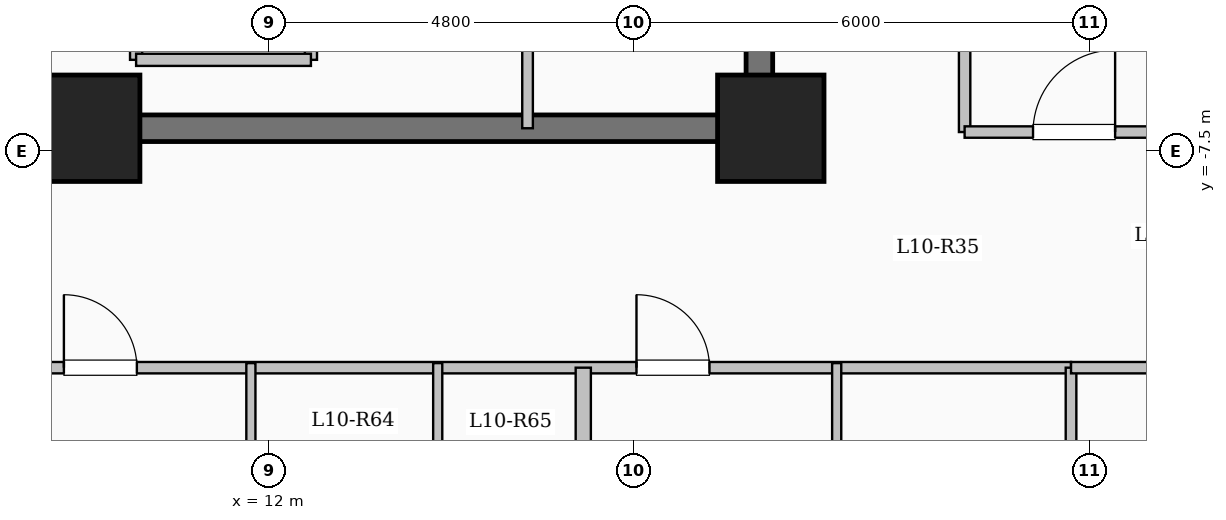
"""IFC4 building model, lengths in metres.
Left out: names, types, materials, properties, quantities, classifications, styles, units other than length and angle.
Written with IfcOpenShell. Run it as: python <this file> out.ifc"""

import sys

from ifc_helpers import new_model, si_unit, direction, frame, frame_2d, origin, origin_2d, place, context, subcontext, project, spatial, rectangle, extrude, element, fill, save


model = new_model("IFC4")
c1 = context("Model", 3, precision=1e-05, world=origin(), true_north=direction((0.0, 1.0)))
c2 = subcontext(c1, "Body", "Model", "MODEL_VIEW")
j1 = project(units=[si_unit("LENGTHUNIT", "METRE"), si_unit("PLANEANGLEUNIT", "RADIAN")], contexts=[c1])
p1 = place(None, origin())
s1 = spatial("IfcSite", under=j1, at=p1, CompositionType="ELEMENT")
p2 = place(p1, origin())
s2 = spatial("IfcBuilding", under=s1, at=p2, CompositionType="ELEMENT")
p3 = place(p2, frame((0.0, 0.0, 40.75)))
s3 = spatial("IfcBuildingStorey", under=s2, at=p3, CompositionType="ELEMENT", Elevation=40.75)
for number, where, z_axis, x_axis in (
    (1, (9.6, -7.2, 0.0), (0.0, 0.0, 1.0), (1.0, 0.0, 0.0)),
    (2, (18.6, -7.2, 0.0), (0.0, 0.0, 1.0), (1.0, 0.0, 0.0)),
):
    element("IfcColumn", number, at=place(p3, frame(where, z_axis=z_axis, x_axis=x_axis)), inside=s3, PredefinedType="COLUMN", context=c2, shape_type="SweptSolid", body=[
        extrude(rectangle(XDim=1.4, YDim=1.4, at=origin_2d()), origin(), (0.0, 0.0, 1.0), 3.35),
    ])
for number, where, z_axis, x_axis in (
    (3, (10.25, -6.3, 0.0), (0.0, 0.0, 1.0), (0.0, 1.0, 0.0)),
    (4, (12.55, -6.3, 0.0), (0.0, 0.0, 1.0), (0.0, 1.0, 0.0)),
):
    element("IfcWall", number, at=place(p3, frame(where, z_axis=z_axis, x_axis=x_axis)), inside=s3, PredefinedType="SOLIDWALL", context=c2, shape_type="SweptSolid", body=[
        extrude(rectangle(XDim=2.6, YDim=0.16, at=frame_2d((1.3, 0.0))), origin(), (0.0, 0.0, 1.0), 3.1),
    ])
p4 = place(p3, frame((10.25, -6.3, 0.0), z_axis=(0.0, 0.0, 1.0), x_axis=(1.0, 0.0, 0.0)))
e5 = element("IfcWall", 5, at=p4, inside=s3, PredefinedType="SOLIDWALL", context=c2, shape_type="SweptSolid", body=[
    extrude(rectangle(XDim=2.3, YDim=0.16, at=frame_2d((1.15, 0.0))), origin(), (0.0, 0.0, 1.0), 3.1),
])
p5 = place(p3, frame((18.45, -7.375, 0.0), z_axis=(0.0, 0.0, 1.0), x_axis=(0.0, 1.0, 0.0)))
e6 = element("IfcWall", 6, at=p5, inside=s3, PredefinedType="SHEAR", context=c2, shape_type="SweptSolid", body=[
    extrude(rectangle(XDim=14.05, YDim=0.35, at=frame_2d((7.025, 0.0))), origin(), (0.0, 0.0, 1.0), 3.35),
])
p6 = place(p3, frame((10.075, -7.2, 0.0), z_axis=(0.0, 0.0, 1.0), x_axis=(1.0, 0.0, 0.0)))
e7 = element("IfcWall", 7, at=p6, inside=s3, PredefinedType="SHEAR", context=c2, shape_type="SweptSolid", body=[
    extrude(rectangle(XDim=8.55, YDim=0.35, at=frame_2d((4.275, 0.0))), origin(), (0.0, 0.0, 1.0), 3.35),
])
p7 = place(p3, frame((15.4, -7.2, 0.0), z_axis=(0.0, 0.0, 1.0), x_axis=(0.0, 1.0, 0.0)))
e8 = element("IfcWall", 8, at=p7, inside=s3, PredefinedType="PARTITIONING", context=c2, shape_type="SweptSolid", body=[
    extrude(rectangle(XDim=10.45, YDim=0.14, at=frame_2d((5.225, 0.0))), origin(), (0.0, 0.0, 1.0), 3.1),
])
p8 = place(p7, frame((9.25, 0.0, 0.0)))
e9 = element("IfcOpeningElement", 9, at=p8, cuts=e8, PredefinedType="OPENING", context=c2, shape_type="SweptSolid", body=[
    extrude(rectangle(XDim=0.9, YDim=2.08, at=frame_2d((0.45, 1.04))), frame((0.0, 0.08, 0.0), z_axis=(0.0, -1.0, 0.0), x_axis=(1.0, 0.0, 0.0)), (0.0, 0.0, 1.0), 0.16),
])
p9 = place(p3, frame((21.15, -7.25, 0.0), z_axis=(0.0, 0.0, 1.0), x_axis=(0.0, 1.0, 0.0)))
e10 = element("IfcWall", 10, at=p9, inside=s3, PredefinedType="PARTITIONING", context=c2, shape_type="SweptSolid", body=[
    extrude(rectangle(XDim=18.0, YDim=0.15, at=frame_2d((9.0, 0.0))), origin(), (0.0, 0.0, 1.0), 2.585),
])
p10 = place(p3, frame((8.55, -10.35, 0.0), z_axis=(0.0, 0.0, 1.0), x_axis=(1.0, 0.0, 0.0)))
e11 = element("IfcWall", 11, at=p10, inside=s3, PredefinedType="PARTITIONING", context=c2, shape_type="SweptSolid", body=[
    extrude(rectangle(XDim=14.0, YDim=0.15, at=frame_2d((7.0, 0.0))), origin(), (0.0, 0.0, 1.0), 3.1),
])
p11 = place(p10, frame((0.75, 0.0, 0.0)))
e12 = element("IfcOpeningElement", 12, at=p11, cuts=e11, PredefinedType="OPENING", context=c2, shape_type="SweptSolid", body=[
    extrude(rectangle(XDim=0.96, YDim=2.15, at=frame_2d((0.48, 1.075))), frame((0.0, 0.085, 0.0), z_axis=(0.0, -1.0, 0.0), x_axis=(1.0, 0.0, 0.0)), (0.0, 0.0, 1.0), 0.17),
])
p12 = place(p10, frame((8.283, 0.0, 0.0)))
e13 = element("IfcOpeningElement", 13, at=p12, cuts=e11, PredefinedType="OPENING", context=c2, shape_type="SweptSolid", body=[
    extrude(rectangle(XDim=0.96, YDim=2.15, at=frame_2d((0.48, 1.075))), frame((0.0, 0.085, 0.0), z_axis=(0.0, -1.0, 0.0), x_axis=(1.0, 0.0, 0.0)), (0.0, 0.0, 1.0), 0.17),
])
p13 = place(p3, frame((16.133, -23.6, 0.0), z_axis=(0.0, 0.0, 1.0), x_axis=(0.0, 1.0, 0.0)))
e14 = element("IfcWall", 14, at=p13, inside=s3, PredefinedType="SOLIDWALL", context=c2, shape_type="SweptSolid", body=[
    extrude(rectangle(XDim=13.25, YDim=0.2, at=frame_2d((6.625, 0.0))), origin(), (0.0, 0.0, 1.0), 3.1),
])
p14 = place(p3, frame((11.76, -23.6, 0.0), z_axis=(0.0, 0.0, 1.0), x_axis=(0.0, 1.0, 0.0)))
e15 = element("IfcWall", 15, at=p14, inside=s3, PredefinedType="PARTITIONING", context=c2, shape_type="SweptSolid", body=[
    extrude(rectangle(XDim=13.31, YDim=0.12, at=frame_2d((6.655, 0.0))), origin(), (0.0, 0.0, 1.0), 3.1),
])
p15 = place(p14, frame((9.315, 0.0, 0.0)))
e16 = element("IfcOpeningElement", 16, at=p15, cuts=e15, PredefinedType="OPENING", context=c2, shape_type="SweptSolid", body=[
    extrude(rectangle(XDim=1.08, YDim=2.15, at=frame_2d((0.54, 1.075))), frame((0.0, 0.07, 0.0), z_axis=(0.0, -1.0, 0.0), x_axis=(1.0, 0.0, 0.0)), (0.0, 0.0, 1.0), 0.14),
])
p16 = place(p3, frame((14.218, -12.92, 0.0), z_axis=(0.0, 0.0, 1.0), x_axis=(0.0, 1.0, 0.0)))
e17 = element("IfcWall", 17, at=p16, inside=s3, PredefinedType="PARTITIONING", context=c2, shape_type="SweptSolid", body=[
    extrude(rectangle(XDim=2.63, YDim=0.12, at=frame_2d((1.315, 0.0))), origin(), (0.0, 0.0, 1.0), 3.1),
])
p17 = place(p3, frame((19.467, -13.51, 0.0), z_axis=(0.0, 0.0, 1.0), x_axis=(0.0, 1.0, 0.0)))
e18 = element("IfcWall", 18, at=p17, inside=s3, PredefinedType="PARTITIONING", context=c2, shape_type="SweptSolid", body=[
    extrude(rectangle(XDim=3.22, YDim=0.12, at=frame_2d((1.61, 0.0))), origin(), (0.0, 0.0, 1.0), 3.1),
])
p18 = place(p17, frame((1.14, 0.0, 0.0)))
e19 = element("IfcOpeningElement", 19, at=p18, cuts=e18, PredefinedType="OPENING", context=c2, shape_type="SweptSolid", body=[
    extrude(rectangle(XDim=0.88, YDim=2.1, at=frame_2d((0.44, 1.05))), frame((0.0, 0.07, 0.0), z_axis=(0.0, -1.0, 0.0), x_axis=(1.0, 0.0, 0.0)), (0.0, 0.0, 1.0), 0.14),
])
p19 = place(p3, frame((21.15, -7.25, 0.0), z_axis=(0.0, 0.0, 1.0), x_axis=(1.0, 0.0, 0.0)))
e20 = element("IfcWall", 20, at=p19, inside=s3, PredefinedType="PARTITIONING", context=c2, shape_type="SweptSolid", body=[
    extrude(rectangle(XDim=7.53, YDim=0.15, at=frame_2d((3.765, 0.0))), origin(), (0.0, 0.0, 1.0), 3.1),
])
p20 = place(p19, frame((0.9, 0.0, 0.0)))
e21 = element("IfcOpeningElement", 21, at=p20, cuts=e20, PredefinedType="OPENING", context=c2, shape_type="SweptSolid", body=[
    extrude(rectangle(XDim=1.08, YDim=2.15, at=frame_2d((0.54, 1.075))), frame((0.0, 0.085, 0.0), z_axis=(0.0, -1.0, 0.0), x_axis=(1.0, 0.0, 0.0)), (0.0, 0.0, 1.0), 0.17),
])
p21 = place(p3, frame((22.55, -19.05, 0.0), z_axis=(0.0, 0.0, 1.0), x_axis=(0.0, 1.0, 0.0)))
e22 = element("IfcWall", 22, at=p21, inside=s3, PredefinedType="PARTITIONING", context=c2, shape_type="SweptSolid", body=[
    extrude(rectangle(XDim=8.7, YDim=0.14, at=frame_2d((4.35, 0.0))), origin(), (0.0, 0.0, 1.0), 3.1),
])
p22 = place(p3, frame((22.55, -10.35, 0.0), z_axis=(0.0, 0.0, 1.0), x_axis=(1.0, 0.0, 0.0)))
e23 = element("IfcWall", 23, at=p22, inside=s3, PredefinedType="PARTITIONING", context=c2, shape_type="SweptSolid", body=[
    extrude(rectangle(XDim=6.13, YDim=0.15, at=frame_2d((3.065, 0.0))), origin(), (0.0, 0.0, 1.0), 3.1),
])
p23 = place(p22, frame((2.59, 0.0, 0.0)))
e24 = element("IfcOpeningElement", 24, at=p23, cuts=e23, PredefinedType="OPENING", context=c2, shape_type="SweptSolid", body=[
    extrude(rectangle(XDim=0.95, YDim=2.15, at=frame_2d((0.475, 1.075))), frame((0.0, 0.085, 0.0), z_axis=(0.0, -1.0, 0.0), x_axis=(1.0, 0.0, 0.0)), (0.0, 0.0, 1.0), 0.17),
])
p24 = place(p11, origin())
e25 = element("IfcDoor", 25, at=p24, inside=s3, OperationType="SINGLE_SWING_LEFT", PredefinedType="DOOR", context=c2, shape_type="SweptSolid", body=[
    extrude(rectangle(XDim=0.96, YDim=2.15, at=frame_2d((0.48, 1.075))), frame((0.0, 0.025, 0.0), z_axis=(0.0, -1.0, 0.0), x_axis=(1.0, 0.0, 0.0)), (0.0, 0.0, 1.0), 0.05),
])
fill(e12, e25)
p25 = place(p12, origin())
e26 = element("IfcDoor", 26, at=p25, inside=s3, OperationType="SINGLE_SWING_LEFT", PredefinedType="DOOR", context=c2, shape_type="SweptSolid", body=[
    extrude(rectangle(XDim=0.96, YDim=2.15, at=frame_2d((0.48, 1.075))), frame((0.0, 0.025, 0.0), z_axis=(0.0, -1.0, 0.0), x_axis=(1.0, 0.0, 0.0)), (0.0, 0.0, 1.0), 0.05),
])
fill(e13, e26)
p26 = place(p20, origin())
e27 = element("IfcDoor", 27, at=p26, inside=s3, OperationType="SINGLE_SWING_RIGHT", PredefinedType="DOOR", context=c2, shape_type="SweptSolid", body=[
    extrude(rectangle(XDim=1.08, YDim=2.15, at=frame_2d((0.54, 1.075))), frame((0.0, 0.025, 0.0), z_axis=(0.0, -1.0, 0.0), x_axis=(1.0, 0.0, 0.0)), (0.0, 0.0, 1.0), 0.05),
])
fill(e21, e27)
save(model, sys.argv[1])
